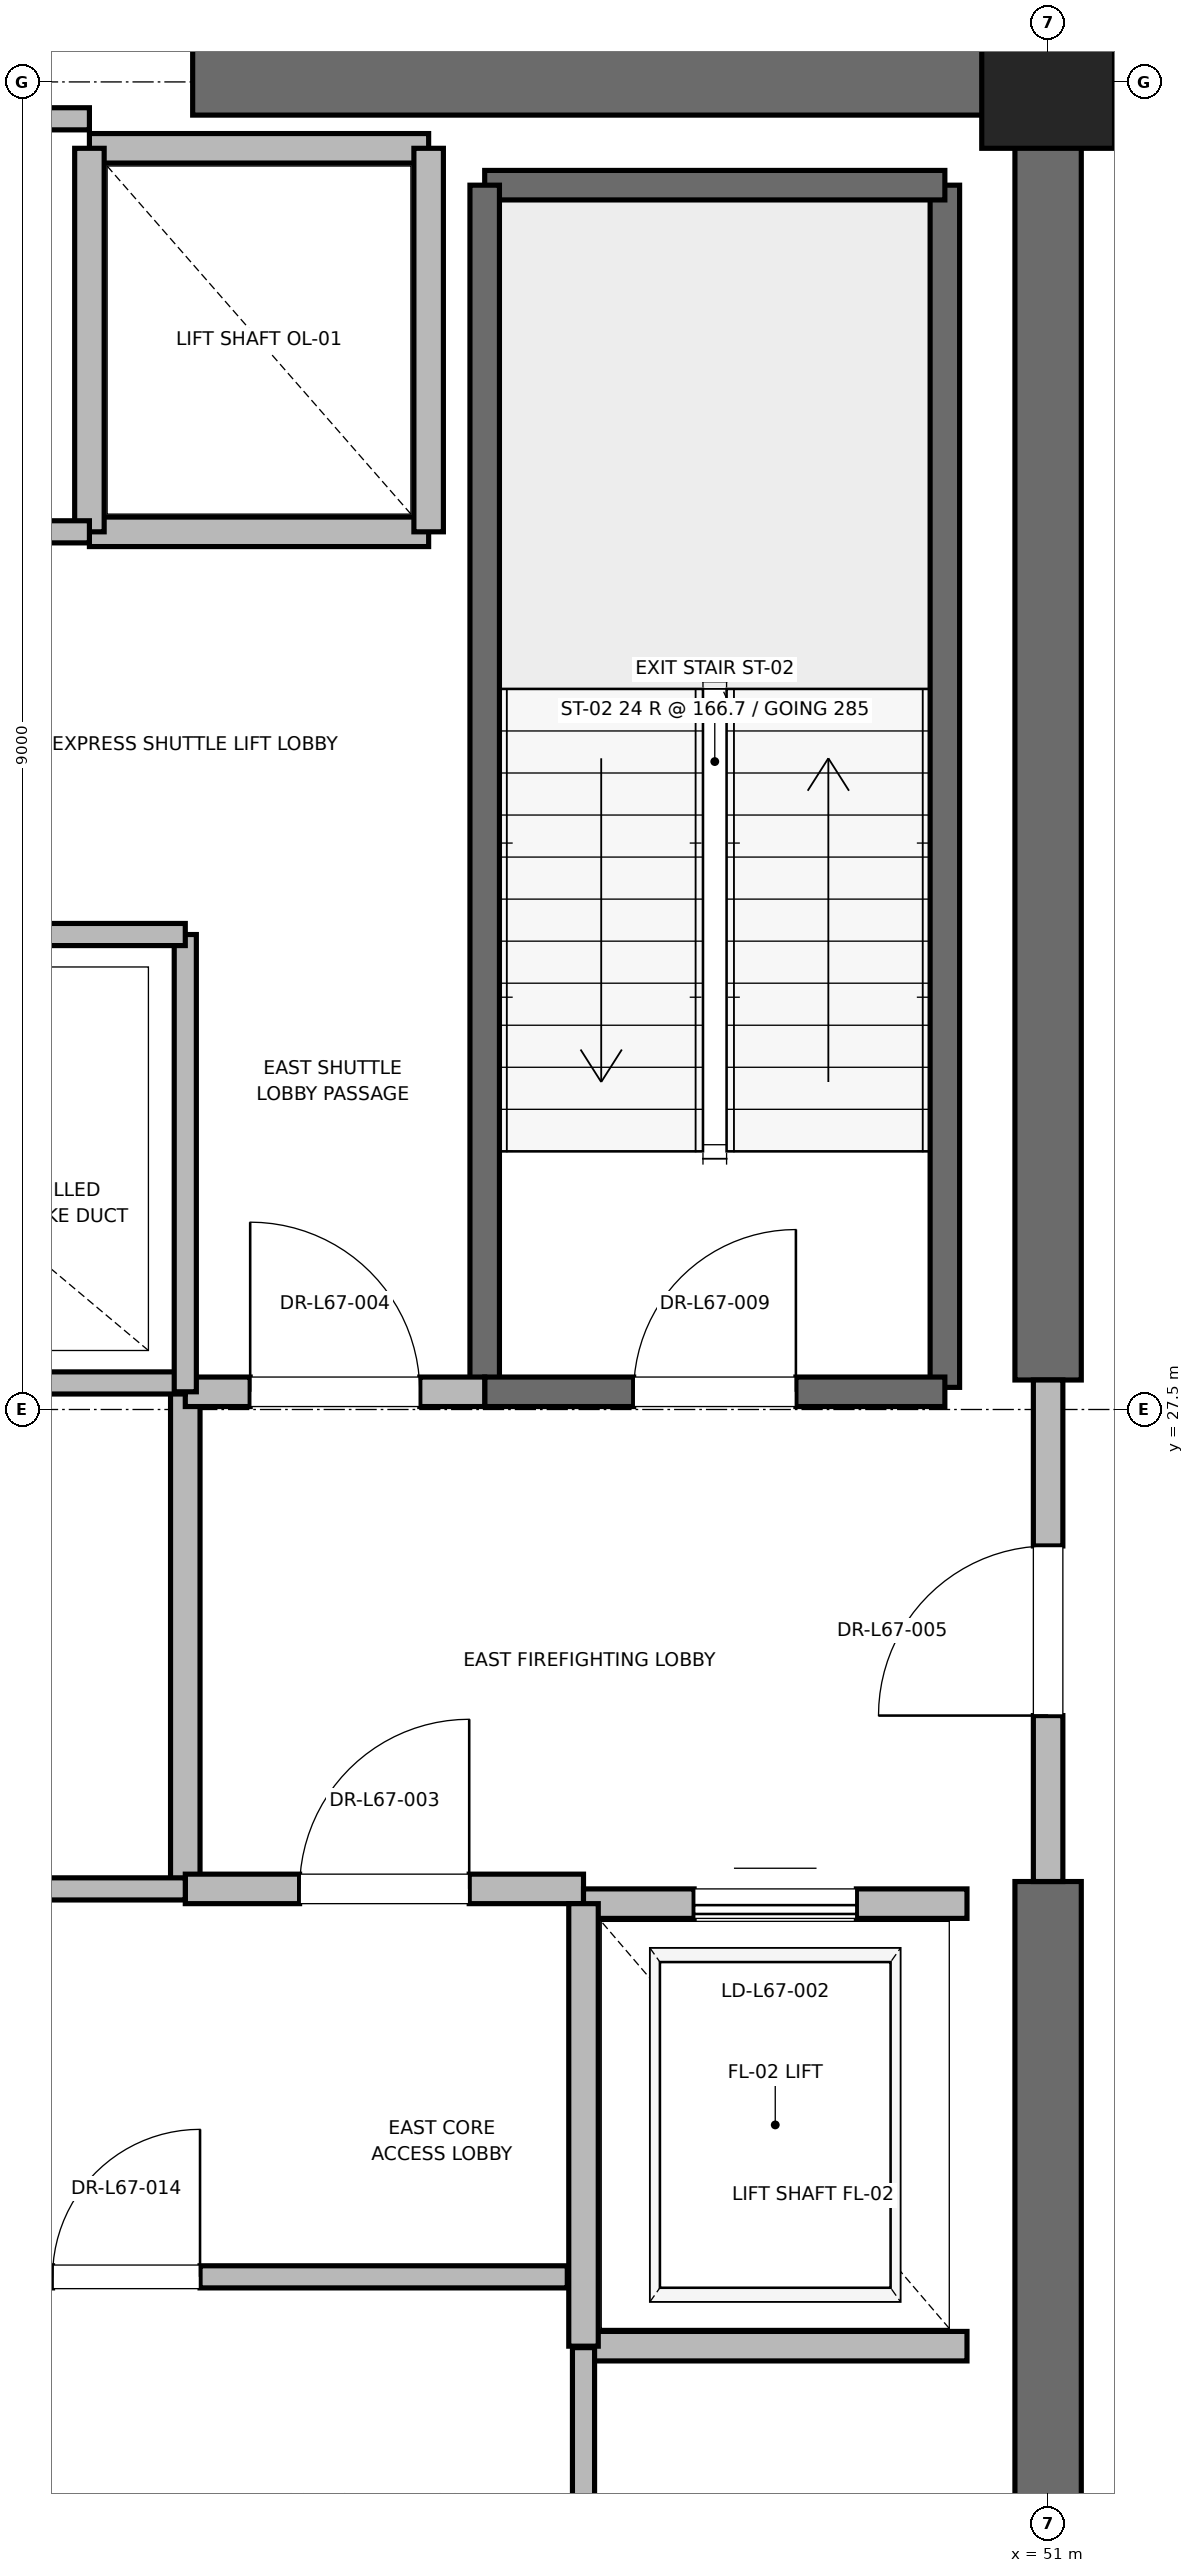
"""IFC4 building model, lengths in metres.
Left out: names, types, materials, properties, quantities, classifications, styles, units other than length and angle.
Written with IfcOpenShell. Run it as: python <this file> out.ifc"""

import sys

from ifc_helpers import new_model, si_unit, direction, frame, frame_2d, origin, origin_2d, place, context, subcontext, project, spatial, rectangle, extrude, element, fill, save


model = new_model("IFC4")
c1 = context("Model", 3, precision=1e-05, world=origin(), true_north=direction((0.0, 1.0)))
c2 = subcontext(c1, "Body", "Model", "MODEL_VIEW")
j1 = project(units=[si_unit("LENGTHUNIT", "METRE"), si_unit("PLANEANGLEUNIT", "RADIAN")], contexts=[c1])
p1 = place(None, origin())
s1 = spatial("IfcSite", under=j1, at=p1, CompositionType="ELEMENT")
p2 = place(p1, origin())
s2 = spatial("IfcBuilding", under=s1, at=p2, CompositionType="ELEMENT")
p3 = place(p2, frame((0.0, 0.0, 287.2)))
s3 = spatial("IfcBuildingStorey", under=s2, at=p3, CompositionType="ELEMENT", Elevation=287.2)
p4 = place(p3, frame((51.0, 36.5, 0.0), z_axis=(0.0, 0.0, 1.0), x_axis=(1.0, 0.0, 0.0)))
e1 = element("IfcColumn", 1, at=p4, inside=s3, PredefinedType="PILASTER", context=c2, shape_type="SweptSolid", body=[
    extrude(rectangle(XDim=0.9, YDim=0.9, at=origin_2d()), origin(), (0.0, 0.0, 1.0), 4.0),
])
for number, where, z_axis, x_axis in (
    (2, (45.2, 36.5, 0.0), (0.0, 0.0, 1.0), (1.0, 0.0, 0.0)),
    (3, (51.0, 18.5, 0.0), (0.0, 0.0, 1.0), (0.0, 1.0, 0.0)),
):
    element("IfcWall", number, at=place(p3, frame(where, z_axis=z_axis, x_axis=x_axis)), inside=s3, PredefinedType="SHEAR", context=c2, shape_type="SweptSolid", body=[
        extrude(rectangle(XDim=5.8, YDim=0.45, at=frame_2d((2.9, 0.0))), origin(), (0.0, 0.0, 1.0), 3.785),
    ])
p5 = place(p3, frame((51.0, 27.7, 0.0), z_axis=(0.0, 0.0, 1.0), x_axis=(0.0, 1.0, 0.0)))
e4 = element("IfcWall", 4, at=p5, inside=s3, PredefinedType="SHEAR", context=c2, shape_type="SweptSolid", body=[
    extrude(rectangle(XDim=8.8, YDim=0.45, at=frame_2d((4.4, 0.0))), origin(), (0.0, 0.0, 1.0), 3.785),
])
p6 = place(p3, frame((50.3, 27.65, 0.0), z_axis=(0.0, 0.0, 1.0), x_axis=(0.0, 1.0, 0.0)))
e5 = element("IfcWall", 5, at=p6, inside=s3, PredefinedType="SOLIDWALL", context=c2, shape_type="SweptSolid", body=[
    extrude(rectangle(XDim=8.15, YDim=0.2, at=frame_2d((4.075, 0.0))), origin(), (0.0, 0.0, 1.0), 3.785),
])
p7 = place(p3, frame((47.18, 35.8, 0.0), z_axis=(0.0, 0.0, 1.0), x_axis=(1.0, 0.0, 0.0)))
e6 = element("IfcWall", 6, at=p7, inside=s3, PredefinedType="SOLIDWALL", context=c2, shape_type="SweptSolid", body=[
    extrude(rectangle(XDim=3.12, YDim=0.2, at=frame_2d((1.56, 0.0))), origin(), (0.0, 0.0, 1.0), 3.785),
])
p8 = place(p3, frame((47.18, 27.62, 0.0), z_axis=(0.0, 0.0, 1.0), x_axis=(0.0, 1.0, 0.0)))
e7 = element("IfcWall", 7, at=p8, inside=s3, PredefinedType="SOLIDWALL", context=c2, shape_type="SweptSolid", body=[
    extrude(rectangle(XDim=8.18, YDim=0.2, at=frame_2d((4.09, 0.0))), origin(), (0.0, 0.0, 1.0), 3.785),
])
p9 = place(p3, frame((47.18, 27.62, 0.0), z_axis=(0.0, 0.0, 1.0), x_axis=(1.0, 0.0, 0.0)))
e8 = element("IfcWall", 8, at=p9, inside=s3, PredefinedType="SOLIDWALL", context=c2, shape_type="SweptSolid", body=[
    extrude(rectangle(XDim=3.12, YDim=0.2, at=frame_2d((1.56, 0.0))), origin(), (0.0, 0.0, 1.0), 3.785),
])
p10 = place(p9, frame((1.01, 0.0, 0.0)))
e9 = element("IfcOpeningElement", 9, at=p10, cuts=e8, PredefinedType="OPENING", context=c2, shape_type="SweptSolid", body=[
    extrude(rectangle(XDim=1.1, YDim=2.15, at=frame_2d((0.55, 1.075))), frame((0.0, 0.1, 0.0), z_axis=(0.0, -1.0, 0.0), x_axis=(1.0, 0.0, 0.0)), (0.0, 0.0, 1.0), 0.2),
])
p11 = place(p3, frame((45.15, 24.25, 0.0), z_axis=(0.0, 0.0, 1.0), x_axis=(0.0, 1.0, 0.0)))
e10 = element("IfcWall", 10, at=p11, inside=s3, PredefinedType="PARTITIONING", context=c2, shape_type="SweptSolid", body=[
    extrude(rectangle(XDim=3.37, YDim=0.2, at=frame_2d((1.685, 0.0))), origin(), (0.0, 0.0, 1.0), 3.785),
])
p12 = place(p3, frame((45.15, 24.25, 0.0), z_axis=(0.0, 0.0, 1.0), x_axis=(1.0, 0.0, 0.0)))
e11 = element("IfcWall", 11, at=p12, inside=s3, PredefinedType="PARTITIONING", context=c2, shape_type="SweptSolid", body=[
    extrude(rectangle(XDim=2.7, YDim=0.2, at=frame_2d((1.35, 0.0))), origin(), (0.0, 0.0, 1.0), 3.785),
])
p13 = place(p12, frame((0.775, 0.0, 0.0)))
e12 = element("IfcOpeningElement", 12, at=p13, cuts=e11, PredefinedType="OPENING", context=c2, shape_type="SweptSolid", body=[
    extrude(rectangle(XDim=1.15, YDim=2.2, at=frame_2d((0.575, 1.1))), frame((0.0, 0.1, 0.0), z_axis=(0.0, -1.0, 0.0), x_axis=(1.0, 0.0, 0.0)), (0.0, 0.0, 1.0), 0.2),
])
p14 = place(p3, frame((45.15, 27.62, 0.0), z_axis=(0.0, 0.0, 1.0), x_axis=(1.0, 0.0, 0.0)))
e13 = element("IfcWall", 13, at=p14, inside=s3, PredefinedType="PARTITIONING", context=c2, shape_type="SweptSolid", body=[
    extrude(rectangle(XDim=2.03, YDim=0.2, at=frame_2d((1.015, 0.0))), origin(), (0.0, 0.0, 1.0), 3.785),
])
p15 = place(p14, frame((0.44, 0.0, 0.0)))
e14 = element("IfcOpeningElement", 14, at=p15, cuts=e13, PredefinedType="OPENING", context=c2, shape_type="SweptSolid", body=[
    extrude(rectangle(XDim=1.15, YDim=2.2, at=frame_2d((0.575, 1.1))), frame((0.0, 0.1, 0.0), z_axis=(0.0, -1.0, 0.0), x_axis=(1.0, 0.0, 0.0)), (0.0, 0.0, 1.0), 0.2),
])
p16 = place(p3, frame((51.0, 24.3, 0.0), z_axis=(0.0, 0.0, 1.0), x_axis=(0.0, 1.0, 0.0)))
e15 = element("IfcWall", 15, at=p16, inside=s3, PredefinedType="PARTITIONING", context=c2, shape_type="SweptSolid", body=[
    extrude(rectangle(XDim=3.4, YDim=0.2, at=frame_2d((1.7, 0.0))), origin(), (0.0, 0.0, 1.0), 2.865),
])
p17 = place(p16, frame((1.125, 0.0, 0.0)))
e16 = element("IfcOpeningElement", 16, at=p17, cuts=e15, PredefinedType="OPENING", context=c2, shape_type="SweptSolid", body=[
    extrude(rectangle(XDim=1.15, YDim=2.2, at=frame_2d((0.575, 1.1))), frame((0.0, 0.1, 0.0), z_axis=(0.0, -1.0, 0.0), x_axis=(1.0, 0.0, 0.0)), (0.0, 0.0, 1.0), 0.2),
])
p18 = place(p3, frame((47.85, 21.15, 0.0), z_axis=(0.0, 0.0, 1.0), x_axis=(1.0, 0.0, 0.0)))
e17 = element("IfcWall", 17, at=p18, inside=s3, PredefinedType="SOLIDWALL", context=c2, shape_type="SweptSolid", body=[
    extrude(rectangle(XDim=2.6, YDim=0.2, at=frame_2d((1.3, 0.0))), origin(), (0.0, 0.0, 1.0), 3.785),
])
p19 = place(p3, frame((50.45, 24.15, 0.0), z_axis=(0.0, 0.0, 1.0), x_axis=(-1.0, 0.0, 0.0)))
e18 = element("IfcWall", 18, at=p19, inside=s3, PredefinedType="SOLIDWALL", context=c2, shape_type="SweptSolid", body=[
    extrude(rectangle(XDim=2.6, YDim=0.2, at=frame_2d((1.3, 0.0))), origin(), (0.0, 0.0, 1.0), 2.865),
])
p20 = place(p19, frame((0.75, 0.0, 0.0)))
e19 = element("IfcOpeningElement", 19, at=p20, cuts=e18, PredefinedType="OPENING", context=c2, shape_type="SweptSolid", body=[
    extrude(rectangle(XDim=1.1, YDim=2.2, at=frame_2d((0.55, 1.1))), frame((0.0, 0.1, 0.0), z_axis=(0.0, -1.0, 0.0), x_axis=(1.0, 0.0, 0.0)), (0.0, 0.0, 1.0), 0.2),
])
p21 = place(p3, frame((47.85, 24.15, 0.0), z_axis=(0.0, 0.0, 1.0), x_axis=(0.0, -1.0, 0.0)))
e20 = element("IfcWall", 20, at=p21, inside=s3, PredefinedType="SOLIDWALL", context=c2, shape_type="SweptSolid", body=[
    extrude(rectangle(XDim=3.0, YDim=0.2, at=frame_2d((1.5, 0.0))), origin(), (0.0, 0.0, 1.0), 3.785),
])
p22 = place(p3, frame((44.5, 33.45, 0.0), z_axis=(0.0, 0.0, 1.0), x_axis=(1.0, 0.0, 0.0)))
e21 = element("IfcWall", 21, at=p22, inside=s3, PredefinedType="SOLIDWALL", context=c2, shape_type="SweptSolid", body=[
    extrude(rectangle(XDim=2.3, YDim=0.2, at=frame_2d((1.15, 0.0))), origin(), (0.0, 0.0, 1.0), 3.785),
])
p23 = place(p3, frame((46.8, 36.05, 0.0), z_axis=(0.0, 0.0, 1.0), x_axis=(-1.0, 0.0, 0.0)))
e22 = element("IfcWall", 22, at=p23, inside=s3, PredefinedType="SOLIDWALL", context=c2, shape_type="SweptSolid", body=[
    extrude(rectangle(XDim=2.3, YDim=0.2, at=frame_2d((1.15, 0.0))), origin(), (0.0, 0.0, 1.0), 2.865),
])
p24 = place(p3, frame((44.5, 36.05, 0.0), z_axis=(0.0, 0.0, 1.0), x_axis=(0.0, -1.0, 0.0)))
e23 = element("IfcWall", 23, at=p24, inside=s3, PredefinedType="SOLIDWALL", context=c2, shape_type="SweptSolid", body=[
    extrude(rectangle(XDim=2.6, YDim=0.2, at=frame_2d((1.3, 0.0))), origin(), (0.0, 0.0, 1.0), 2.865),
])
p25 = place(p3, frame((46.8, 33.45, 0.0), z_axis=(0.0, 0.0, 1.0), x_axis=(0.0, 1.0, 0.0)))
e24 = element("IfcWall", 24, at=p25, inside=s3, PredefinedType="SOLIDWALL", context=c2, shape_type="SweptSolid", body=[
    extrude(rectangle(XDim=2.6, YDim=0.2, at=frame_2d((1.3, 0.0))), origin(), (0.0, 0.0, 1.0), 3.785),
])
p26 = place(p3, frame((41.56, 27.68, 0.0), z_axis=(0.0, 0.0, 1.0), x_axis=(1.0, 0.0, 0.0)))
e25 = element("IfcWall", 25, at=p26, inside=s3, PredefinedType="PARTITIONING", context=c2, shape_type="SweptSolid", body=[
    extrude(rectangle(XDim=3.59, YDim=0.15, at=frame_2d((1.795, 0.0))), origin(), (0.0, 0.0, 1.0), 2.85),
])
p27 = place(p3, frame((47.85, 18.6, 0.0), z_axis=(0.0, 0.0, 1.0), x_axis=(0.0, 1.0, 0.0)))
e26 = element("IfcWall", 26, at=p27, inside=s3, PredefinedType="PARTITIONING", context=c2, shape_type="SweptSolid", body=[
    extrude(rectangle(XDim=2.54, YDim=0.15, at=frame_2d((1.27, 0.0))), origin(), (0.0, 0.0, 1.0), 2.85),
])
p28 = place(p3, frame((41.76, 21.62, 0.0), z_axis=(0.0, 0.0, 1.0), x_axis=(1.0, 0.0, 0.0)))
e27 = element("IfcWall", 27, at=p28, inside=s3, PredefinedType="PARTITIONING", context=c2, shape_type="SweptSolid", body=[
    extrude(rectangle(XDim=5.98, YDim=0.15, at=frame_2d((2.99, 0.0))), origin(), (0.0, 0.0, 1.0), 2.85),
])
p29 = place(p28, frame((2.49, 0.0, 0.0)))
e28 = element("IfcOpeningElement", 28, at=p29, cuts=e27, PredefinedType="OPENING", context=c2, shape_type="SweptSolid", body=[
    extrude(rectangle(XDim=1.0, YDim=2.15, at=frame_2d((0.5, 1.075))), frame((0.0, 0.075, 0.0), z_axis=(0.0, -1.0, 0.0), x_axis=(1.0, 0.0, 0.0)), (0.0, 0.0, 1.0), 0.15),
])
p30 = place(p3, frame((41.76, 24.25, 0.0), z_axis=(0.0, 0.0, 1.0), x_axis=(1.0, 0.0, 0.0)))
e29 = element("IfcWall", 29, at=p30, inside=s3, PredefinedType="PARTITIONING", context=c2, shape_type="SweptSolid", body=[
    extrude(rectangle(XDim=3.39, YDim=0.15, at=frame_2d((1.695, 0.0))), origin(), (0.0, 0.0, 1.0), 2.85),
])
p31 = place(p30, frame((1.195, 0.0, 0.0)))
e30 = element("IfcOpeningElement", 30, at=p31, cuts=e29, PredefinedType="OPENING", context=c2, shape_type="SweptSolid", body=[
    extrude(rectangle(XDim=1.0, YDim=2.15, at=frame_2d((0.5, 1.075))), frame((0.0, 0.075, 0.0), z_axis=(0.0, -1.0, 0.0), x_axis=(1.0, 0.0, 0.0)), (0.0, 0.0, 1.0), 0.15),
])
p32 = place(p3, frame((45.15, 27.62, 0.0), z_axis=(0.0, 0.0, 1.0), x_axis=(0.0, 1.0, 0.0)))
e31 = element("IfcWall", 31, at=p32, inside=s3, PredefinedType="PARTITIONING", context=c2, shape_type="SweptSolid", body=[
    extrude(rectangle(XDim=3.1, YDim=0.15, at=frame_2d((1.55, 0.0))), origin(), (0.0, 0.0, 1.0), 2.85),
])
p33 = place(p3, frame((41.56, 30.72, 0.0), z_axis=(0.0, 0.0, 1.0), x_axis=(1.0, 0.0, 0.0)))
e32 = element("IfcWall", 32, at=p33, inside=s3, PredefinedType="PARTITIONING", context=c2, shape_type="SweptSolid", body=[
    extrude(rectangle(XDim=3.59, YDim=0.15, at=frame_2d((1.795, 0.0))), origin(), (0.0, 0.0, 1.0), 2.85),
])
p34 = place(p33, frame((1.355, 0.0, 0.0)))
e33 = element("IfcOpeningElement", 33, at=p34, cuts=e32, PredefinedType="OPENING", context=c2, shape_type="SweptSolid", body=[
    extrude(rectangle(XDim=0.88, YDim=2.1, at=frame_2d((0.44, 1.05))), frame((0.0, 0.075, 0.0), z_axis=(0.0, -1.0, 0.0), x_axis=(1.0, 0.0, 0.0)), (0.0, 0.0, 1.0), 0.15),
])
p35 = place(p3, frame((41.56, 36.25, 0.0), z_axis=(0.0, 0.0, 1.0), x_axis=(1.0, 0.0, 0.0)))
e34 = element("IfcWall", 34, at=p35, inside=s3, PredefinedType="PARTITIONING", context=c2, shape_type="SweptSolid", body=[
    extrude(rectangle(XDim=2.94, YDim=0.15, at=frame_2d((1.47, 0.0))), origin(), (0.0, 0.0, 1.0), 2.85),
])
p36 = place(p3, frame((41.56, 33.45, 0.0), z_axis=(0.0, 0.0, 1.0), x_axis=(1.0, 0.0, 0.0)))
e35 = element("IfcWall", 35, at=p36, inside=s3, PredefinedType="PARTITIONING", context=c2, shape_type="SweptSolid", body=[
    extrude(rectangle(XDim=2.94, YDim=0.15, at=frame_2d((1.47, 0.0))), origin(), (0.0, 0.0, 1.0), 2.85),
])
p37 = place(p36, frame((1.03, 0.0, 0.0)))
e36 = element("IfcOpeningElement", 36, at=p37, cuts=e35, PredefinedType="OPENING", context=c2, shape_type="SweptSolid", body=[
    extrude(rectangle(XDim=0.88, YDim=2.1, at=frame_2d((0.44, 1.05))), frame((0.0, 0.075, 0.0), z_axis=(0.0, -1.0, 0.0), x_axis=(1.0, 0.0, 0.0)), (0.0, 0.0, 1.0), 0.15),
])
p38 = place(p10, origin())
e37 = element("IfcDoor", 37, at=p38, inside=s3, OperationType="SINGLE_SWING_RIGHT", PredefinedType="DOOR", context=c2, shape_type="SweptSolid", body=[
    extrude(rectangle(XDim=1.1, YDim=2.15, at=frame_2d((0.55, 1.075))), frame((0.0, 0.025, 0.0), z_axis=(0.0, -1.0, 0.0), x_axis=(1.0, 0.0, 0.0)), (0.0, 0.0, 1.0), 0.05),
])
fill(e9, e37)
p39 = place(p13, origin())
e38 = element("IfcDoor", 38, at=p39, inside=s3, OperationType="SINGLE_SWING_RIGHT", PredefinedType="DOOR", context=c2, shape_type="SweptSolid", body=[
    extrude(rectangle(XDim=1.15, YDim=2.2, at=frame_2d((0.575, 1.1))), frame((0.0, 0.025, 0.0), z_axis=(0.0, -1.0, 0.0), x_axis=(1.0, 0.0, 0.0)), (0.0, 0.0, 1.0), 0.05),
])
fill(e12, e38)
p40 = place(p15, origin())
e39 = element("IfcDoor", 39, at=p40, inside=s3, OperationType="SINGLE_SWING_LEFT", PredefinedType="DOOR", context=c2, shape_type="SweptSolid", body=[
    extrude(rectangle(XDim=1.15, YDim=2.2, at=frame_2d((0.575, 1.1))), frame((0.0, 0.025, 0.0), z_axis=(0.0, -1.0, 0.0), x_axis=(1.0, 0.0, 0.0)), (0.0, 0.0, 1.0), 0.05),
])
fill(e14, e39)
p41 = place(p17, origin())
e40 = element("IfcDoor", 40, at=p41, inside=s3, OperationType="SINGLE_SWING_LEFT", PredefinedType="DOOR", context=c2, shape_type="SweptSolid", body=[
    extrude(rectangle(XDim=1.15, YDim=2.2, at=frame_2d((0.575, 1.1))), frame((0.0, 0.025, 0.0), z_axis=(0.0, -1.0, 0.0), x_axis=(1.0, 0.0, 0.0)), (0.0, 0.0, 1.0), 0.05),
])
fill(e16, e40)
p42 = place(p20, origin())
e41 = element("IfcDoor", 41, at=p42, inside=s3, OperationType="SLIDING_TO_RIGHT", PredefinedType="DOOR", context=c2, shape_type="SweptSolid", body=[
    extrude(rectangle(XDim=1.1, YDim=2.2, at=frame_2d((0.55, 1.1))), frame((0.0, 0.025, 0.0), z_axis=(0.0, -1.0, 0.0), x_axis=(1.0, 0.0, 0.0)), (0.0, 0.0, 1.0), 0.05),
])
fill(e19, e41)
p43 = place(p29, origin())
e42 = element("IfcDoor", 42, at=p43, inside=s3, OperationType="SINGLE_SWING_RIGHT", PredefinedType="DOOR", context=c2, shape_type="SweptSolid", body=[
    extrude(rectangle(XDim=1.0, YDim=2.15, at=frame_2d((0.5, 1.075))), frame((0.0, 0.025, 0.0), z_axis=(0.0, -1.0, 0.0), x_axis=(1.0, 0.0, 0.0)), (0.0, 0.0, 1.0), 0.05),
])
fill(e28, e42)
save(model, sys.argv[1])
